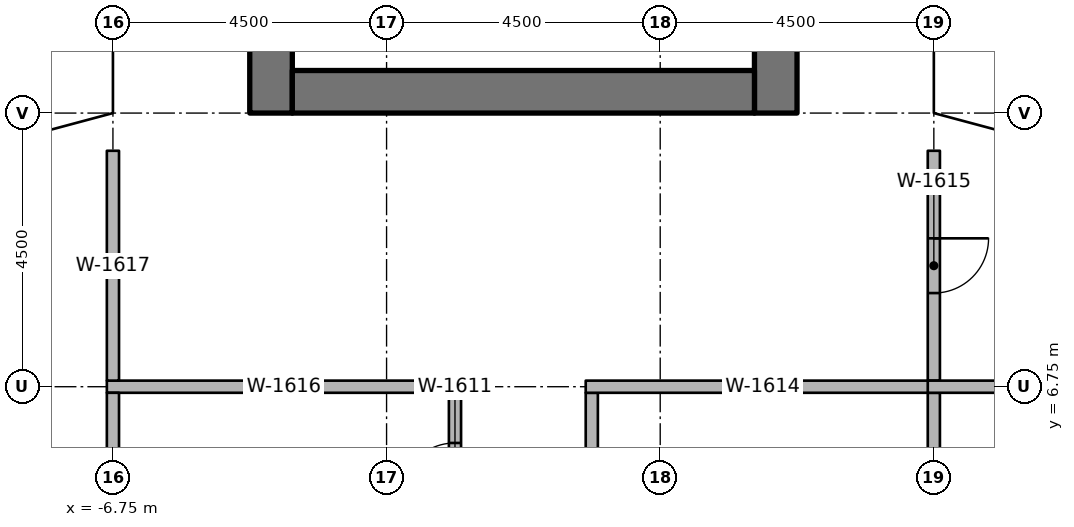
"""IFC4 building model, lengths in metres.
Left out: names, types, materials, properties, quantities, classifications, styles, units other than length and angle.
Written with IfcOpenShell. Run it as: python <this file> out.ifc"""

import sys

from ifc_helpers import new_model, si_unit, direction, frame, frame_2d, origin, origin_2d, place, context, subcontext, project, spatial, rectangle, extrude, element, fill, save


model = new_model("IFC4")
c1 = context("Model", 3, precision=1e-05, world=origin(), true_north=direction((0.0, 1.0)))
c2 = subcontext(c1, "Body", "Model", "MODEL_VIEW")
j1 = project(units=[si_unit("LENGTHUNIT", "METRE"), si_unit("PLANEANGLEUNIT", "RADIAN")], contexts=[c1])
p1 = place(None, origin())
s1 = spatial("IfcSite", under=j1, at=p1, CompositionType="ELEMENT")
p2 = place(p1, origin())
s2 = spatial("IfcBuilding", under=s1, at=p2, CompositionType="ELEMENT")
p3 = place(p2, frame((0.0, 0.0, 156.2)))
s3 = spatial("IfcBuildingStorey", under=s2, at=p3, CompositionType="ELEMENT", Elevation=156.2)
for number, where, z_axis, x_axis in (
    (1, (-6.25, 6.25, 0.0), (0.0, 0.0, 1.0), (1.0, 0.0, 0.0)),
    (2, (-6.25, 10.75, 0.0), (0.0, 0.0, 1.0), (1.0, 0.0, 0.0)),
    (3, (6.25, 6.25, 0.0), (0.0, 0.0, 1.0), (1.0, 0.0, 0.0)),
    (4, (6.25, 10.75, 0.0), (0.0, 0.0, 1.0), (1.0, 0.0, 0.0)),
):
    element("IfcColumn", number, at=place(p3, frame(where, z_axis=z_axis, x_axis=x_axis)), inside=s3, PredefinedType="COLUMN", context=c2, shape_type="SweptSolid", body=[
        extrude(rectangle(XDim=0.8, YDim=0.8, at=origin_2d()), origin(), (0.0, 0.0, 1.0), 3.65),
    ])
p4 = place(p3, frame((-4.15, 11.25, 0.0), z_axis=(0.0, 0.0, 1.0), x_axis=(0.0, 1.0, 0.0)))
e5 = element("IfcWall", 5, at=p4, inside=s3, PredefinedType="SHEAR", context=c2, shape_type="SweptSolid", body=[
    extrude(rectangle(XDim=15.0, YDim=0.7, at=frame_2d((7.5, 0.0))), origin(), (0.0, 0.0, 1.0), 3.8),
])
p5 = place(p4, frame((7.15, 0.0, 0.0)))
e6 = element("IfcOpeningElement", 6, at=p5, cuts=e5, PredefinedType="OPENING", context=c2, shape_type="SweptSolid", body=[
    extrude(rectangle(XDim=1.5, YDim=2.3, at=frame_2d((0.75, 1.15))), frame((0.0, 0.36, 0.0), z_axis=(0.0, -1.0, 0.0), x_axis=(1.0, 0.0, 0.0)), (0.0, 0.0, 1.0), 0.72),
])
p6 = place(p4, frame((13.9, 0.0, 0.0)))
e7 = element("IfcOpeningElement", 7, at=p6, cuts=e5, PredefinedType="OPENING", context=c2, shape_type="SweptSolid", body=[
    extrude(rectangle(XDim=0.9, YDim=2.1, at=frame_2d((0.45, 1.05))), frame((0.0, 0.36, 0.0), z_axis=(0.0, -1.0, 0.0), x_axis=(1.0, 0.0, 0.0)), (0.0, 0.0, 1.0), 0.72),
])
p7 = place(p4, frame((1.15, 0.0, 0.0)))
e8 = element("IfcOpeningElement", 8, at=p7, cuts=e5, PredefinedType="OPENING", context=c2, shape_type="SweptSolid", body=[
    extrude(rectangle(XDim=1.2, YDim=2.1, at=frame_2d((0.6, 1.05))), frame((0.0, 0.36, 0.0), z_axis=(0.0, -1.0, 0.0), x_axis=(1.0, 0.0, 0.0)), (0.0, 0.0, 1.0), 0.72),
])
p8 = place(p3, frame((4.15, 11.25, 0.0), z_axis=(0.0, 0.0, 1.0), x_axis=(0.0, 1.0, 0.0)))
e9 = element("IfcWall", 9, at=p8, inside=s3, PredefinedType="SHEAR", context=c2, shape_type="SweptSolid", body=[
    extrude(rectangle(XDim=15.0, YDim=0.7, at=frame_2d((7.5, 0.0))), origin(), (0.0, 0.0, 1.0), 3.8),
])
p9 = place(p8, frame((7.15, 0.0, 0.0)))
e10 = element("IfcOpeningElement", 10, at=p9, cuts=e9, PredefinedType="OPENING", context=c2, shape_type="SweptSolid", body=[
    extrude(rectangle(XDim=1.5, YDim=2.3, at=frame_2d((0.75, 1.15))), frame((0.0, 0.36, 0.0), z_axis=(0.0, -1.0, 0.0), x_axis=(1.0, 0.0, 0.0)), (0.0, 0.0, 1.0), 0.72),
])
p10 = place(p8, frame((5.55, 0.0, 0.0)))
e11 = element("IfcOpeningElement", 11, at=p10, cuts=e9, PredefinedType="OPENING", context=c2, shape_type="SweptSolid", body=[
    extrude(rectangle(XDim=1.2, YDim=2.1, at=frame_2d((0.6, 1.05))), frame((0.0, 0.36, 0.0), z_axis=(0.0, -1.0, 0.0), x_axis=(1.0, 0.0, 0.0)), (0.0, 0.0, 1.0), 0.72),
])
p11 = place(p3, frame((-3.8, 11.6, 0.0), z_axis=(0.0, 0.0, 1.0), x_axis=(1.0, 0.0, 0.0)))
e12 = element("IfcWall", 12, at=p11, inside=s3, PredefinedType="SHEAR", context=c2, shape_type="SweptSolid", body=[
    extrude(rectangle(XDim=7.6, YDim=0.7, at=frame_2d((3.8, 0.0))), origin(), (0.0, 0.0, 1.0), 3.8),
])
p12 = place(p3, frame((1.125, 1.225, 0.0), z_axis=(0.0, 0.0, 1.0), x_axis=(0.0, 1.0, 0.0)))
e13 = element("IfcWall", 13, at=p12, inside=s3, PredefinedType="PARTITIONING", context=c2, shape_type="SweptSolid", body=[
    extrude(rectangle(XDim=5.425, YDim=0.2, at=frame_2d((2.712, 0.0))), origin(), (0.0, 0.0, 1.0), 2.75),
])
p13 = place(p3, frame((-1.125, 4.1, 0.0), z_axis=(0.0, 0.0, 1.0), x_axis=(0.0, 1.0, 0.0)))
e14 = element("IfcWall", 14, at=p13, inside=s3, PredefinedType="PARTITIONING", context=c2, shape_type="SweptSolid", body=[
    extrude(rectangle(XDim=2.55, YDim=0.2, at=frame_2d((1.275, 0.0))), origin(), (0.0, 0.0, 1.0), 2.75),
])
p14 = place(p13, frame((0.825, 0.0, 0.0)))
e15 = element("IfcOpeningElement", 15, at=p14, cuts=e14, PredefinedType="OPENING", context=c2, shape_type="SweptSolid", body=[
    extrude(rectangle(XDim=0.9, YDim=2.1, at=frame_2d((0.45, 1.05))), frame((0.0, 0.11, 0.0), z_axis=(0.0, -1.0, 0.0), x_axis=(1.0, 0.0, 0.0)), (0.0, 0.0, 1.0), 0.22),
])
p15 = place(p3, frame((1.025, 6.75, 0.0), z_axis=(0.0, 0.0, 1.0), x_axis=(1.0, 0.0, 0.0)))
e16 = element("IfcWall", 16, at=p15, inside=s3, PredefinedType="PARTITIONING", context=c2, shape_type="SweptSolid", body=[
    extrude(rectangle(XDim=5.825, YDim=0.2, at=frame_2d((2.913, 0.0))), origin(), (0.0, 0.0, 1.0), 2.75),
])
p16 = place(p3, frame((6.75, 10.63, 0.0), z_axis=(0.0, 0.0, 1.0), x_axis=(0.0, -1.0, 0.0)))
e17 = element("IfcWall", 17, at=p16, inside=s3, PredefinedType="PARTITIONING", context=c2, shape_type="SweptSolid", body=[
    extrude(rectangle(XDim=3.78, YDim=0.2, at=frame_2d((1.89, 0.0))), origin(), (0.0, 0.0, 1.0), 2.75),
])
p17 = place(p16, frame((1.44, 0.0, 0.0)))
e18 = element("IfcOpeningElement", 18, at=p17, cuts=e17, PredefinedType="OPENING", context=c2, shape_type="SweptSolid", body=[
    extrude(rectangle(XDim=0.9, YDim=2.1, at=frame_2d((0.45, 1.05))), frame((0.0, 0.11, 0.0), z_axis=(0.0, -1.0, 0.0), x_axis=(1.0, 0.0, 0.0)), (0.0, 0.0, 1.0), 0.22),
])
p18 = place(p3, frame((-6.85, 6.75, 0.0), z_axis=(0.0, 0.0, 1.0), x_axis=(1.0, 0.0, 0.0)))
e19 = element("IfcWall", 19, at=p18, inside=s3, PredefinedType="PARTITIONING", context=c2, shape_type="SweptSolid", body=[
    extrude(rectangle(XDim=5.825, YDim=0.2, at=frame_2d((2.913, 0.0))), origin(), (0.0, 0.0, 1.0), 2.75),
])
p19 = place(p3, frame((-6.75, 6.85, 0.0), z_axis=(0.0, 0.0, 1.0), x_axis=(0.0, 1.0, 0.0)))
e20 = element("IfcWall", 20, at=p19, inside=s3, PredefinedType="PARTITIONING", context=c2, shape_type="SweptSolid", body=[
    extrude(rectangle(XDim=3.78, YDim=0.2, at=frame_2d((1.89, 0.0))), origin(), (0.0, 0.0, 1.0), 2.75),
])
p20 = place(p3, frame((6.75, 1.225, 0.0), z_axis=(0.0, 0.0, 1.0), x_axis=(0.0, 1.0, 0.0)))
e21 = element("IfcWall", 21, at=p20, inside=s3, PredefinedType="PARTITIONING", context=c2, shape_type="SweptSolid", body=[
    extrude(rectangle(XDim=5.425, YDim=0.2, at=frame_2d((2.712, 0.0))), origin(), (0.0, 0.0, 1.0), 2.75),
])
p21 = place(p3, frame((6.65, 6.75, 0.0), z_axis=(0.0, 0.0, 1.0), x_axis=(1.0, 0.0, 0.0)))
e22 = element("IfcWall", 22, at=p21, inside=s3, PredefinedType="PARTITIONING", context=c2, shape_type="SweptSolid", body=[
    extrude(rectangle(XDim=4.7, YDim=0.2, at=frame_2d((2.35, 0.0))), origin(), (0.0, 0.0, 1.0), 2.75),
])
p22 = place(p3, frame((-6.75, 4.1, 0.0), z_axis=(0.0, 0.0, 1.0), x_axis=(0.0, 1.0, 0.0)))
e23 = element("IfcWall", 23, at=p22, inside=s3, PredefinedType="PARTITIONING", context=c2, shape_type="SweptSolid", body=[
    extrude(rectangle(XDim=2.55, YDim=0.2, at=frame_2d((1.275, 0.0))), origin(), (0.0, 0.0, 1.0), 2.75),
])
p23 = place(p17, origin())
e24 = element("IfcDoor", 24, at=p23, inside=s3, OperationType="SINGLE_SWING_RIGHT", PredefinedType="DOOR", context=c2, shape_type="SweptSolid", body=[
    extrude(rectangle(XDim=0.9, YDim=2.1, at=frame_2d((0.45, 1.05))), frame((0.0, 0.025, 0.0), z_axis=(0.0, -1.0, 0.0), x_axis=(1.0, 0.0, 0.0)), (0.0, 0.0, 1.0), 0.05),
])
fill(e18, e24)
p24 = place(p14, origin())
e25 = element("IfcDoor", 25, at=p24, inside=s3, OperationType="SINGLE_SWING_RIGHT", PredefinedType="DOOR", context=c2, shape_type="SweptSolid", body=[
    extrude(rectangle(XDim=0.9, YDim=2.1, at=frame_2d((0.45, 1.05))), frame((0.0, 0.025, 0.0), z_axis=(0.0, -1.0, 0.0), x_axis=(1.0, 0.0, 0.0)), (0.0, 0.0, 1.0), 0.05),
])
fill(e15, e25)
save(model, sys.argv[1])
